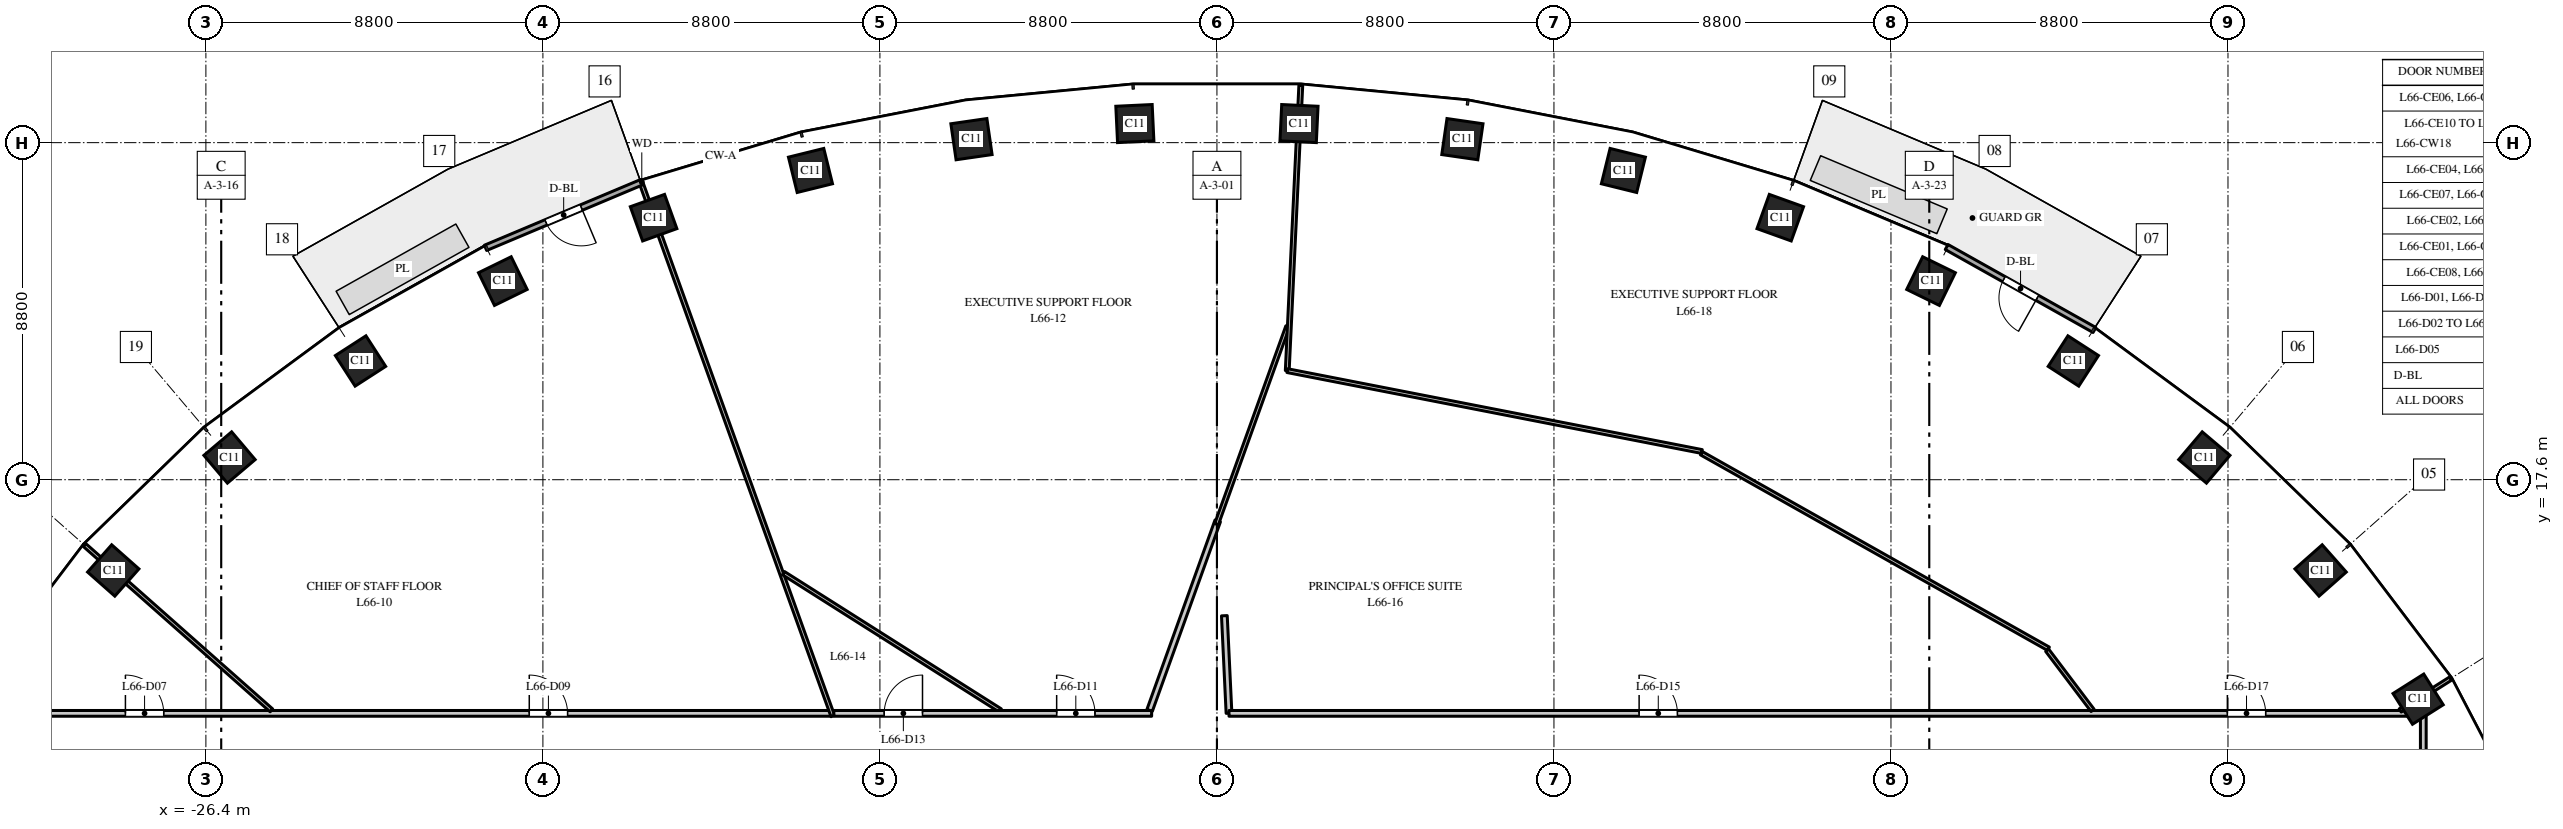
"""IFC4 building model, lengths in metres.
Left out: names, types, materials, properties, quantities, classifications, styles, units other than length and angle.
Written with IfcOpenShell. Run it as: python <this file> out.ifc"""

import sys

from ifc_helpers import new_model, si_unit, direction, frame, frame_2d, origin, origin_2d, place, context, subcontext, project, spatial, rectangle, extrude, element, fill, save


model = new_model("IFC4")
c1 = context("Model", 3, precision=1e-05, world=origin(), true_north=direction((0.0, 1.0)))
c2 = subcontext(c1, "Body", "Model", "MODEL_VIEW")
j1 = project(units=[si_unit("LENGTHUNIT", "METRE"), si_unit("PLANEANGLEUNIT", "RADIAN")], contexts=[c1])
p1 = place(None, origin())
s1 = spatial("IfcSite", under=j1, at=p1, CompositionType="ELEMENT")
p2 = place(p1, origin())
s2 = spatial("IfcBuilding", under=s1, at=p2, CompositionType="ELEMENT")
p3 = place(p2, frame((0.0, 0.0, 307.0)))
s3 = spatial("IfcBuildingStorey", under=s2, at=p3, CompositionType="ELEMENT", Elevation=307.0)
for number, where, z_axis, x_axis in (
    (1, (31.365, 11.871, 0.0), (0.0, 0.0, 1.0), (-0.535, 0.845, 0.0)),
    (2, (28.819, 15.23, 0.0), (0.0, 0.0, 1.0), (-0.663, 0.749, 0.0)),
    (3, (25.783, 18.18, 0.0), (0.0, 0.0, 1.0), (-0.763, 0.646, 0.0)),
    (4, (22.362, 20.7, 0.0), (0.0, 0.0, 1.0), (-0.84, 0.542, 0.0)),
    (5, (18.646, 22.785, 0.0), (0.0, 0.0, 1.0), (-0.898, 0.439, 0.0)),
    (6, (14.709, 24.441, 0.0), (0.0, 0.0, 1.0), (-0.941, 0.338, 0.0)),
    (7, (10.613, 25.674, 0.0), (0.0, 0.0, 1.0), (-0.971, 0.24, 0.0)),
    (8, (6.409, 26.491, 0.0), (0.0, 0.0, 1.0), (-0.99, 0.143, 0.0)),
    (9, (2.143, 26.898, 0.0), (0.0, 0.0, 1.0), (-0.999, 0.048, 0.0)),
    (10, (-2.143, 26.898, 0.0), (0.0, 0.0, 1.0), (-0.999, -0.048, 0.0)),
    (11, (-6.409, 26.491, 0.0), (0.0, 0.0, 1.0), (-0.99, -0.143, 0.0)),
    (12, (-10.613, 25.674, 0.0), (0.0, 0.0, 1.0), (-0.971, -0.24, 0.0)),
    (13, (-14.709, 24.441, 0.0), (0.0, 0.0, 1.0), (-0.941, -0.338, 0.0)),
    (14, (-18.646, 22.785, 0.0), (0.0, 0.0, 1.0), (-0.898, -0.439, 0.0)),
    (15, (-22.362, 20.7, 0.0), (0.0, 0.0, 1.0), (-0.84, -0.542, 0.0)),
    (16, (-25.783, 18.18, 0.0), (0.0, 0.0, 1.0), (-0.763, -0.646, 0.0)),
    (17, (-28.819, 15.23, 0.0), (0.0, 0.0, 1.0), (-0.663, -0.749, 0.0)),
):
    element("IfcColumn", number, at=place(p3, frame(where, z_axis=z_axis, x_axis=x_axis)), inside=s3, PredefinedType="COLUMN", context=c2, shape_type="SweptSolid", body=[
        extrude(rectangle(XDim=0.95, YDim=0.95, at=origin_2d()), origin(), (0.0, 0.0, 1.0), 4.0),
    ])
p4 = place(p3, frame((22.913, 21.509, 0.0), z_axis=(0.0, 0.0, 1.0), x_axis=(-0.872046572975, 0.489422899509, 0.0)))
e18 = element("IfcWall", 18, at=p4, inside=s3, PredefinedType="STANDARD", context=c2, shape_type="SweptSolid", body=[
    extrude(rectangle(XDim=4.426, YDim=0.15, at=frame_2d((2.213, 0.0))), origin(), (0.0, 0.0, 1.0), 3.7),
])
p5 = place(p4, frame((1.713, 0.0, 0.0)))
e19 = element("IfcOpeningElement", 19, at=p5, cuts=e18, PredefinedType="OPENING", context=c2, shape_type="SweptSolid", body=[
    extrude(rectangle(XDim=1.0, YDim=2.4, at=frame_2d((0.5, 1.2))), frame((0.0, 0.085, 0.0), z_axis=(0.0, -1.0, 0.0), x_axis=(1.0, 0.0, 0.0)), (0.0, 0.0, 1.0), 0.17),
])
p6 = place(p3, frame((-15.018, 25.369, 0.0), z_axis=(0.0, 0.0, 1.0), x_axis=(-0.921816985161, -0.387625393736, 0.0)))
e20 = element("IfcWall", 20, at=p6, inside=s3, PredefinedType="STANDARD", context=c2, shape_type="SweptSolid", body=[
    extrude(rectangle(XDim=4.426, YDim=0.15, at=frame_2d((2.213, 0.0))), origin(), (0.0, 0.0, 1.0), 3.7),
])
p7 = place(p6, frame((1.713, 0.0, 0.0)))
e21 = element("IfcOpeningElement", 21, at=p7, cuts=e20, PredefinedType="OPENING", context=c2, shape_type="SweptSolid", body=[
    extrude(rectangle(XDim=1.0, YDim=2.4, at=frame_2d((0.5, 1.2))), frame((0.0, 0.085, 0.0), z_axis=(0.0, -1.0, 0.0), x_axis=(1.0, 0.0, 0.0)), (0.0, 0.0, 1.0), 0.17),
])
p8 = place(p3, frame((-31.5, 11.5, 0.0), z_axis=(0.0, 0.0, 1.0), x_axis=(1.0, 0.0, 0.0)))
e22 = element("IfcWall", 22, at=p8, inside=s3, PredefinedType="PARTITIONING", context=c2, shape_type="SweptSolid", body=[
    extrude(rectangle(XDim=21.432, YDim=0.15, at=frame_2d((10.716, 0.0))), origin(), (0.0, 0.0, 1.0), 2.75),
])
p9 = place(p8, frame((2.999, 0.0, 0.0)))
e23 = element("IfcOpeningElement", 23, at=p9, cuts=e22, PredefinedType="OPENING", context=c2, shape_type="SweptSolid", body=[
    extrude(rectangle(XDim=1.0, YDim=2.1, at=frame_2d((0.5, 1.05))), frame((0.0, 0.085, 0.0), z_axis=(0.0, -1.0, 0.0), x_axis=(1.0, 0.0, 0.0)), (0.0, 0.0, 1.0), 0.17),
])
p10 = place(p8, frame((13.544, 0.0, 0.0)))
e24 = element("IfcOpeningElement", 24, at=p10, cuts=e22, PredefinedType="OPENING", context=c2, shape_type="SweptSolid", body=[
    extrude(rectangle(XDim=1.0, YDim=2.1, at=frame_2d((0.5, 1.05))), frame((0.0, 0.085, 0.0), z_axis=(0.0, -1.0, 0.0), x_axis=(1.0, 0.0, 0.0)), (0.0, 0.0, 1.0), 0.17),
])
p11 = place(p3, frame((-29.569, 15.895, 0.0), z_axis=(0.0, 0.0, 1.0), x_axis=(0.748988695283, -0.662582775461, 0.0)))
e25 = element("IfcWall", 25, at=p11, inside=s3, PredefinedType="PARTITIONING", context=c2, shape_type="SweptSolid", body=[
    extrude(rectangle(XDim=6.516, YDim=0.1, at=frame_2d((3.258, 0.0))), origin(), (0.0, 0.0, 1.0), 3.0),
])
p12 = place(p3, frame((-15.047, 25.383, 0.0), z_axis=(0.0, 0.0, 1.0), x_axis=(0.338338153279, -0.941024597997, 0.0)))
e26 = element("IfcWall", 26, at=p12, inside=s3, PredefinedType="PARTITIONING", context=c2, shape_type="SweptSolid", body=[
    extrude(rectangle(XDim=14.829, YDim=0.1, at=frame_2d((7.414, 0.0))), origin(), (0.0, 0.0, 1.0), 2.75),
])
p13 = place(p3, frame((-11.319, 15.161, 0.0), z_axis=(0.0, 0.0, 1.0), x_axis=(0.844865171483, -0.534979291203, 0.0)))
e27 = element("IfcWall", 27, at=p13, inside=s3, PredefinedType="PARTITIONING", context=c2, shape_type="SweptSolid", body=[
    extrude(rectangle(XDim=6.703, YDim=0.1, at=frame_2d((3.352, 0.0))), origin(), (0.0, 0.0, 1.0), 3.7),
])
p14 = place(p3, frame((-10.003, 11.5, 0.0), z_axis=(0.0, 0.0, 1.0), x_axis=(1.0, 0.0, 0.0)))
e28 = element("IfcWall", 28, at=p14, inside=s3, PredefinedType="PARTITIONING", context=c2, shape_type="SweptSolid", body=[
    extrude(rectangle(XDim=8.298, YDim=0.15, at=frame_2d((4.149, 0.0))), origin(), (0.0, 0.0, 1.0), 2.75),
])
p15 = place(p14, frame((5.818, 0.0, 0.0)))
e29 = element("IfcOpeningElement", 29, at=p15, cuts=e28, PredefinedType="OPENING", context=c2, shape_type="SweptSolid", body=[
    extrude(rectangle(XDim=1.0, YDim=2.1, at=frame_2d((0.5, 1.05))), frame((0.0, 0.085, 0.0), z_axis=(0.0, -1.0, 0.0), x_axis=(1.0, 0.0, 0.0)), (0.0, 0.0, 1.0), 0.17),
])
p16 = place(p14, frame((1.315, 0.0, 0.0)))
e30 = element("IfcOpeningElement", 30, at=p16, cuts=e28, PredefinedType="OPENING", context=c2, shape_type="SweptSolid", body=[
    extrude(rectangle(XDim=1.0, YDim=2.1, at=frame_2d((0.5, 1.05))), frame((0.0, 0.085, 0.0), z_axis=(0.0, -1.0, 0.0), x_axis=(1.0, 0.0, 0.0)), (0.0, 0.0, 1.0), 0.17),
])
p17 = place(p3, frame((-1.757, 11.579, 0.0), z_axis=(0.0, 0.0, 1.0), x_axis=(0.338313142308, 0.941033590124, 0.0)))
e31 = element("IfcWall", 31, at=p17, inside=s3, PredefinedType="PARTITIONING", context=c2, shape_type="SweptSolid", body=[
    extrude(rectangle(XDim=5.256, YDim=0.15, at=frame_2d((2.628, 0.0))), origin(), (0.0, 0.0, 1.0), 2.85),
])
p18 = place(p3, frame((-0.01, 16.438, 0.0), z_axis=(0.0, 0.0, 1.0), x_axis=(0.338376018219, 0.941010983089, 0.0)))
e32 = element("IfcWall", 32, at=p18, inside=s3, PredefinedType="PARTITIONING", context=c2, shape_type="SweptSolid", body=[
    extrude(rectangle(XDim=5.488, YDim=0.1, at=frame_2d((2.744, 0.0))), origin(), (0.0, 0.0, 1.0), 3.7),
])
p19 = place(p3, frame((0.194, 14.049, 0.0), z_axis=(0.0, 0.0, 1.0), x_axis=(0.047428579634, -0.99887463169, 0.0)))
e33 = element("IfcWall", 33, at=p19, inside=s3, PredefinedType="PARTITIONING", context=c2, shape_type="SweptSolid", body=[
    extrude(rectangle(XDim=2.548, YDim=0.15, at=frame_2d((1.274, 0.0))), origin(), (0.0, 0.0, 1.0), 3.7),
])
p20 = place(p3, frame((0.315, 11.5, 0.0), z_axis=(0.0, 0.0, 1.0), x_axis=(1.0, 0.0, 0.0)))
e34 = element("IfcWall", 34, at=p20, inside=s3, PredefinedType="PARTITIONING", context=c2, shape_type="SweptSolid", body=[
    extrude(rectangle(XDim=31.185, YDim=0.15, at=frame_2d((15.593, 0.0))), origin(), (0.0, 0.0, 1.0), 2.75),
])
p21 = place(p20, frame((10.709, 0.0, 0.0)))
e35 = element("IfcOpeningElement", 35, at=p21, cuts=e34, PredefinedType="OPENING", context=c2, shape_type="SweptSolid", body=[
    extrude(rectangle(XDim=1.0, YDim=2.1, at=frame_2d((0.5, 1.05))), frame((0.0, 0.085, 0.0), z_axis=(0.0, -1.0, 0.0), x_axis=(1.0, 0.0, 0.0)), (0.0, 0.0, 1.0), 0.17),
])
p22 = place(p20, frame((26.069, 0.0, 0.0)))
e36 = element("IfcOpeningElement", 36, at=p22, cuts=e34, PredefinedType="OPENING", context=c2, shape_type="SweptSolid", body=[
    extrude(rectangle(XDim=1.0, YDim=2.1, at=frame_2d((0.5, 1.05))), frame((0.0, 0.085, 0.0), z_axis=(0.0, -1.0, 0.0), x_axis=(1.0, 0.0, 0.0)), (0.0, 0.0, 1.0), 0.17),
])
p23 = place(p3, frame((1.836, 20.448, 0.0), z_axis=(0.0, 0.0, 1.0), x_axis=(0.04746405939, 0.998872946408, 0.0)))
e37 = element("IfcWall", 37, at=p23, inside=s3, PredefinedType="PARTITIONING", context=c2, shape_type="SweptSolid", body=[
    extrude(rectangle(XDim=7.458, YDim=0.1, at=frame_2d((3.729, 0.0))), origin(), (0.0, 0.0, 1.0), 3.0),
])
p24 = place(p3, frame((1.836, 20.448, 0.0), z_axis=(0.0, 0.0, 1.0), x_axis=(0.981503271738, -0.191445364444, 0.0)))
e38 = element("IfcWall", 38, at=p24, inside=s3, PredefinedType="PARTITIONING", context=c2, shape_type="SweptSolid", body=[
    extrude(rectangle(XDim=11.032, YDim=0.1, at=frame_2d((5.516, 0.0))), origin(), (0.0, 0.0, 1.0), 2.85),
])
p25 = place(p3, frame((12.648, 18.293, 0.0), z_axis=(0.0, 0.0, 1.0), x_axis=(0.871228121457, -0.490878355994, 0.0)))
e39 = element("IfcWall", 39, at=p25, inside=s3, PredefinedType="PARTITIONING", context=c2, shape_type="SweptSolid", body=[
    extrude(rectangle(XDim=10.404, YDim=0.1, at=frame_2d((5.202, 0.0))), origin(), (0.0, 0.0, 1.0), 3.7),
])
p26 = place(p3, frame((21.679, 13.148, 0.0), z_axis=(0.0, 0.0, 1.0), x_axis=(0.602755856466, -0.797925671661, 0.0)))
e40 = element("IfcWall", 40, at=p26, inside=s3, PredefinedType="PARTITIONING", context=c2, shape_type="SweptSolid", body=[
    extrude(rectangle(XDim=1.968, YDim=0.1, at=frame_2d((0.984, 0.0))), origin(), (0.0, 0.0, 1.0), 2.75),
])
p27 = place(p3, frame((30.897, 11.575, 0.0), z_axis=(0.0, 0.0, 1.0), x_axis=(0.844757626245, 0.535149094086, 0.0)))
e41 = element("IfcWall", 41, at=p27, inside=s3, PredefinedType="PARTITIONING", context=c2, shape_type="SweptSolid", body=[
    extrude(rectangle(XDim=1.557, YDim=0.1, at=frame_2d((0.778, 0.0))), origin(), (0.0, 0.0, 1.0), 3.0),
])
p28 = place(p3, frame((31.5, 8.5, 0.0), z_axis=(0.0, 0.0, 1.0), x_axis=(0.0, 1.0, 0.0)))
e42 = element("IfcWall", 42, at=p28, inside=s3, PredefinedType="PARTITIONING", context=c2, shape_type="SweptSolid", body=[
    extrude(rectangle(XDim=3.0, YDim=0.15, at=frame_2d((1.5, 0.0))), origin(), (0.0, 0.0, 1.0), 3.0),
])
p29 = place(p5, origin())
e43 = element("IfcDoor", 43, at=p29, inside=s3, OperationType="SINGLE_SWING_LEFT", PredefinedType="DOOR", context=c2, shape_type="SweptSolid", body=[
    extrude(rectangle(XDim=1.0, YDim=2.4, at=frame_2d((0.5, 1.2))), frame((0.0, 0.025, 0.0), z_axis=(0.0, -1.0, 0.0), x_axis=(1.0, 0.0, 0.0)), (0.0, 0.0, 1.0), 0.05),
])
fill(e19, e43)
p30 = place(p7, origin())
e44 = element("IfcDoor", 44, at=p30, inside=s3, OperationType="SINGLE_SWING_LEFT", PredefinedType="DOOR", context=c2, shape_type="SweptSolid", body=[
    extrude(rectangle(XDim=1.0, YDim=2.4, at=frame_2d((0.5, 1.2))), frame((0.0, 0.025, 0.0), z_axis=(0.0, -1.0, 0.0), x_axis=(1.0, 0.0, 0.0)), (0.0, 0.0, 1.0), 0.05),
])
fill(e21, e44)
p31 = place(p9, origin())
e45 = element("IfcDoor", 45, at=p31, inside=s3, OperationType="SINGLE_SWING_LEFT", PredefinedType="DOOR", context=c2, shape_type="SweptSolid", body=[
    extrude(rectangle(XDim=1.0, YDim=2.1, at=frame_2d((0.5, 1.05))), frame((0.0, 0.025, 0.0), z_axis=(0.0, -1.0, 0.0), x_axis=(1.0, 0.0, 0.0)), (0.0, 0.0, 1.0), 0.05),
])
fill(e23, e45)
p32 = place(p10, origin())
e46 = element("IfcDoor", 46, at=p32, inside=s3, OperationType="SINGLE_SWING_LEFT", PredefinedType="DOOR", context=c2, shape_type="SweptSolid", body=[
    extrude(rectangle(XDim=1.0, YDim=2.1, at=frame_2d((0.5, 1.05))), frame((0.0, 0.025, 0.0), z_axis=(0.0, -1.0, 0.0), x_axis=(1.0, 0.0, 0.0)), (0.0, 0.0, 1.0), 0.05),
])
fill(e24, e46)
p33 = place(p15, origin())
e47 = element("IfcDoor", 47, at=p33, inside=s3, OperationType="SINGLE_SWING_LEFT", PredefinedType="DOOR", context=c2, shape_type="SweptSolid", body=[
    extrude(rectangle(XDim=1.0, YDim=2.1, at=frame_2d((0.5, 1.05))), frame((0.0, 0.025, 0.0), z_axis=(0.0, -1.0, 0.0), x_axis=(1.0, 0.0, 0.0)), (0.0, 0.0, 1.0), 0.05),
])
fill(e29, e47)
p34 = place(p16, origin())
e48 = element("IfcDoor", 48, at=p34, inside=s3, OperationType="SINGLE_SWING_RIGHT", PredefinedType="DOOR", context=c2, shape_type="SweptSolid", body=[
    extrude(rectangle(XDim=1.0, YDim=2.1, at=frame_2d((0.5, 1.05))), frame((0.0, 0.025, 0.0), z_axis=(0.0, -1.0, 0.0), x_axis=(1.0, 0.0, 0.0)), (0.0, 0.0, 1.0), 0.05),
])
fill(e30, e48)
p35 = place(p21, origin())
e49 = element("IfcDoor", 49, at=p35, inside=s3, OperationType="SINGLE_SWING_LEFT", PredefinedType="DOOR", context=c2, shape_type="SweptSolid", body=[
    extrude(rectangle(XDim=1.0, YDim=2.1, at=frame_2d((0.5, 1.05))), frame((0.0, 0.025, 0.0), z_axis=(0.0, -1.0, 0.0), x_axis=(1.0, 0.0, 0.0)), (0.0, 0.0, 1.0), 0.05),
])
fill(e35, e49)
p36 = place(p22, origin())
e50 = element("IfcDoor", 50, at=p36, inside=s3, OperationType="SINGLE_SWING_LEFT", PredefinedType="DOOR", context=c2, shape_type="SweptSolid", body=[
    extrude(rectangle(XDim=1.0, YDim=2.1, at=frame_2d((0.5, 1.05))), frame((0.0, 0.025, 0.0), z_axis=(0.0, -1.0, 0.0), x_axis=(1.0, 0.0, 0.0)), (0.0, 0.0, 1.0), 0.05),
])
fill(e36, e50)
save(model, sys.argv[1])
